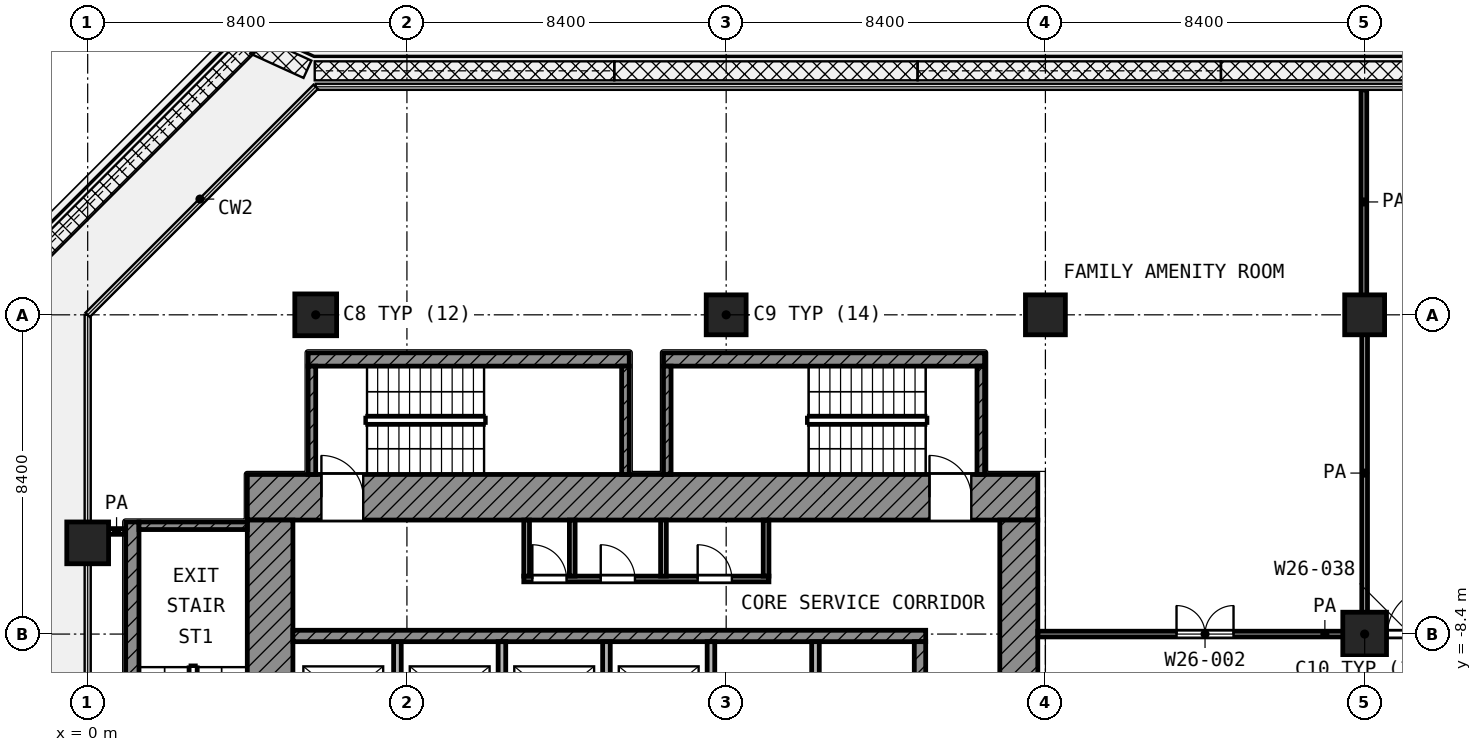
"""IFC4 building model, lengths in metres.
Left out: names, types, materials, properties, quantities, classifications, styles, units other than length and angle.
Written with IfcOpenShell. Run it as: python <this file> out.ifc"""

import sys

from ifc_helpers import new_model, si_unit, direction, frame, frame_2d, origin, origin_2d, place, context, subcontext, project, spatial, rectangle, extrude, element, fill, save


model = new_model("IFC4")
c1 = context("Model", 3, precision=1e-05, world=origin(), true_north=direction((0.0, 1.0)))
c2 = subcontext(c1, "Body", "Model", "MODEL_VIEW")
j1 = project(units=[si_unit("LENGTHUNIT", "METRE"), si_unit("PLANEANGLEUNIT", "RADIAN")], contexts=[c1])
p1 = place(None, origin())
s1 = spatial("IfcSite", under=j1, at=p1, CompositionType="ELEMENT")
p2 = place(p1, origin())
s2 = spatial("IfcBuilding", under=s1, at=p2, CompositionType="ELEMENT")
p3 = place(p2, frame((0.0, 0.0, 136.6)))
s3 = spatial("IfcBuildingStorey", under=s2, at=p3, CompositionType="ELEMENT", Elevation=136.6)
p4 = place(p3, frame((6.0, 0.0, 0.0), z_axis=(0.0, 0.0, 1.0), x_axis=(1.0, 0.0, 0.0)))
e1 = element("IfcColumn", 1, at=p4, inside=s3, PredefinedType="COLUMN", context=c2, shape_type="SweptSolid", body=[
    extrude(rectangle(XDim=1.1, YDim=1.1, at=origin_2d()), origin(), (0.0, 0.0, 1.0), 4.2),
])
for number, where, z_axis, x_axis in (
    (2, (16.8, 0.0, 0.0), (0.0, 0.0, 1.0), (1.0, 0.0, 0.0)),
    (3, (25.2, 0.0, 0.0), (0.0, 0.0, 1.0), (1.0, 0.0, 0.0)),
    (4, (33.6, 0.0, 0.0), (0.0, 0.0, 1.0), (1.0, 0.0, 0.0)),
):
    element("IfcColumn", number, at=place(p3, frame(where, z_axis=z_axis, x_axis=x_axis)), inside=s3, PredefinedType="COLUMN", context=c2, shape_type="SweptSolid", body=[
        extrude(rectangle(XDim=1.05, YDim=1.05, at=origin_2d()), origin(), (0.0, 0.0, 1.0), 4.2),
    ])
p5 = place(p3, frame((0.0, -6.0, 0.0), z_axis=(0.0, 0.0, 1.0), x_axis=(1.0, 0.0, 0.0)))
e5 = element("IfcColumn", 5, at=p5, inside=s3, PredefinedType="COLUMN", context=c2, shape_type="SweptSolid", body=[
    extrude(rectangle(XDim=1.1, YDim=1.1, at=origin_2d()), origin(), (0.0, 0.0, 1.0), 4.2),
])
p6 = place(p3, frame((33.6, -8.4, 0.0), z_axis=(0.0, 0.0, 1.0), x_axis=(1.0, 0.0, 0.0)))
e6 = element("IfcColumn", 6, at=p6, inside=s3, PredefinedType="COLUMN", context=c2, shape_type="SweptSolid", body=[
    extrude(rectangle(XDim=1.15, YDim=1.15, at=origin_2d()), origin(), (0.0, 0.0, 1.0), 4.2),
])
p7 = place(p3, frame((4.2, -4.8, 0.0), z_axis=(0.0, 0.0, 1.0), x_axis=(1.0, 0.0, 0.0)))
e7 = element("IfcWall", 7, at=p7, inside=s3, PredefinedType="SHEAR", context=c2, shape_type="SweptSolid", body=[
    extrude(rectangle(XDim=20.8, YDim=1.2, at=frame_2d((10.4, 0.0))), origin(), (0.0, 0.0, 1.0), 3.6),
])
p8 = place(p7, frame((1.95, 0.0, 0.0)))
e8 = element("IfcOpeningElement", 8, at=p8, cuts=e7, PredefinedType="OPENING", context=c2, shape_type="SweptSolid", body=[
    extrude(rectangle(XDim=1.1, YDim=2.1, at=frame_2d((0.55, 1.05))), frame((0.0, 0.61, 0.0), z_axis=(0.0, -1.0, 0.0), x_axis=(1.0, 0.0, 0.0)), (0.0, 0.0, 1.0), 1.22),
])
p9 = place(p7, frame((17.95, 0.0, 0.0)))
e9 = element("IfcOpeningElement", 9, at=p9, cuts=e7, PredefinedType="OPENING", context=c2, shape_type="SweptSolid", body=[
    extrude(rectangle(XDim=1.1, YDim=2.1, at=frame_2d((0.55, 1.05))), frame((0.0, 0.61, 0.0), z_axis=(0.0, -1.0, 0.0), x_axis=(1.0, 0.0, 0.0)), (0.0, 0.0, 1.0), 1.22),
])
p10 = place(p3, frame((4.8, -25.0, 0.0), z_axis=(0.0, 0.0, 1.0), x_axis=(0.0, 1.0, 0.0)))
e10 = element("IfcWall", 10, at=p10, inside=s3, PredefinedType="SHEAR", context=c2, shape_type="SweptSolid", body=[
    extrude(rectangle(XDim=19.6, YDim=1.2, at=frame_2d((9.8, 0.0))), origin(), (0.0, 0.0, 1.0), 3.6),
])
p11 = place(p10, frame((11.45, 0.0, 0.0)))
e11 = element("IfcOpeningElement", 11, at=p11, cuts=e10, PredefinedType="OPENING", context=c2, shape_type="SweptSolid", body=[
    extrude(rectangle(XDim=1.1, YDim=2.1, at=frame_2d((0.55, 1.05))), frame((0.0, 0.61, 0.0), z_axis=(0.0, -1.0, 0.0), x_axis=(1.0, 0.0, 0.0)), (0.0, 0.0, 1.0), 1.22),
])
p12 = place(p10, frame((2.15, 0.0, 0.0)))
e12 = element("IfcOpeningElement", 12, at=p12, cuts=e10, PredefinedType="OPENING", context=c2, shape_type="SweptSolid", body=[
    extrude(rectangle(XDim=1.1, YDim=2.1, at=frame_2d((0.55, 1.05))), frame((0.0, 0.61, 0.0), z_axis=(0.0, -1.0, 0.0), x_axis=(1.0, 0.0, 0.0)), (0.0, 0.0, 1.0), 1.22),
])
p13 = place(p3, frame((24.5, -24.0, 0.0), z_axis=(0.0, 0.0, 1.0), x_axis=(0.0, 1.0, 0.0)))
e13 = element("IfcWall", 13, at=p13, inside=s3, PredefinedType="SHEAR", context=c2, shape_type="SweptSolid", body=[
    extrude(rectangle(XDim=18.6, YDim=1.0, at=frame_2d((9.3, 0.0))), origin(), (0.0, 0.0, 1.0), 3.6),
])
p14 = place(p13, frame((10.5, 0.0, 0.0)))
e14 = element("IfcOpeningElement", 14, at=p14, cuts=e13, PredefinedType="OPENING", context=c2, shape_type="SweptSolid", body=[
    extrude(rectangle(XDim=1.8, YDim=2.1, at=frame_2d((0.9, 1.05))), frame((0.0, 0.51, 0.0), z_axis=(0.0, -1.0, 0.0), x_axis=(1.0, 0.0, 0.0)), (0.0, 0.0, 1.0), 1.02),
])
p15 = place(p3, frame((5.4, -8.45, 0.0), z_axis=(0.0, 0.0, 1.0), x_axis=(1.0, 0.0, 0.0)))
e15 = element("IfcWall", 15, at=p15, inside=s3, PredefinedType="SHEAR", context=c2, shape_type="SweptSolid", body=[
    extrude(rectangle(XDim=16.65, YDim=0.3, at=frame_2d((8.325, 0.0))), origin(), (0.0, 0.0, 1.0), 3.6),
])
p16 = place(p3, frame((21.9, -10.95, 0.0), z_axis=(0.0, 0.0, 1.0), x_axis=(0.0, 1.0, 0.0)))
e16 = element("IfcWall", 16, at=p16, inside=s3, PredefinedType="SHEAR", context=c2, shape_type="SweptSolid", body=[
    extrude(rectangle(XDim=2.35, YDim=0.3, at=frame_2d((1.175, 0.0))), origin(), (0.0, 0.0, 1.0), 3.6),
])
for number, where, z_axis, x_axis in (
    (17, (8.15, -10.95, 0.0), (0.0, 0.0, 1.0), (0.0, 1.0, 0.0)),
    (18, (10.9, -10.95, 0.0), (0.0, 0.0, 1.0), (0.0, 1.0, 0.0)),
    (19, (13.65, -10.95, 0.0), (0.0, 0.0, 1.0), (0.0, 1.0, 0.0)),
    (20, (16.4, -10.95, 0.0), (0.0, 0.0, 1.0), (0.0, 1.0, 0.0)),
    (21, (19.15, -10.95, 0.0), (0.0, 0.0, 1.0), (0.0, 1.0, 0.0)),
):
    element("IfcWall", number, at=place(p3, frame(where, z_axis=z_axis, x_axis=x_axis)), inside=s3, PredefinedType="PARTITIONING", context=c2, shape_type="SweptSolid", body=[
        extrude(rectangle(XDim=2.35, YDim=0.2, at=frame_2d((1.175, 0.0))), origin(), (0.0, 0.0, 1.0), 3.6),
    ])
p17 = place(p3, frame((11.475, -6.95, 0.0), z_axis=(0.0, 0.0, 1.0), x_axis=(1.0, 0.0, 0.0)))
e22 = element("IfcWall", 22, at=p17, inside=s3, PredefinedType="PARTITIONING", context=c2, shape_type="SweptSolid", body=[
    extrude(rectangle(XDim=6.45, YDim=0.15, at=frame_2d((3.225, 0.0))), origin(), (0.0, 0.0, 1.0), 3.6),
])
p18 = place(p17, frame((0.225, 0.0, 0.0)))
e23 = element("IfcOpeningElement", 23, at=p18, cuts=e22, PredefinedType="OPENING", context=c2, shape_type="SweptSolid", body=[
    extrude(rectangle(XDim=0.9, YDim=2.1, at=frame_2d((0.45, 1.05))), frame((0.0, 0.085, 0.0), z_axis=(0.0, -1.0, 0.0), x_axis=(1.0, 0.0, 0.0)), (0.0, 0.0, 1.0), 0.17),
])
p19 = place(p17, frame((2.025, 0.0, 0.0)))
e24 = element("IfcOpeningElement", 24, at=p19, cuts=e22, PredefinedType="OPENING", context=c2, shape_type="SweptSolid", body=[
    extrude(rectangle(XDim=0.9, YDim=2.1, at=frame_2d((0.45, 1.05))), frame((0.0, 0.085, 0.0), z_axis=(0.0, -1.0, 0.0), x_axis=(1.0, 0.0, 0.0)), (0.0, 0.0, 1.0), 0.17),
])
p20 = place(p17, frame((4.575, 0.0, 0.0)))
e25 = element("IfcOpeningElement", 25, at=p20, cuts=e22, PredefinedType="OPENING", context=c2, shape_type="SweptSolid", body=[
    extrude(rectangle(XDim=0.9, YDim=2.1, at=frame_2d((0.45, 1.05))), frame((0.0, 0.085, 0.0), z_axis=(0.0, -1.0, 0.0), x_axis=(1.0, 0.0, 0.0)), (0.0, 0.0, 1.0), 0.17),
])
for number, where, z_axis, x_axis in (
    (26, (11.55, -6.875, 0.0), (0.0, 0.0, 1.0), (0.0, 1.0, 0.0)),
    (27, (12.75, -6.875, 0.0), (0.0, 0.0, 1.0), (0.0, 1.0, 0.0)),
    (28, (15.15, -6.875, 0.0), (0.0, 0.0, 1.0), (0.0, 1.0, 0.0)),
    (29, (17.85, -6.875, 0.0), (0.0, 0.0, 1.0), (0.0, 1.0, 0.0)),
):
    element("IfcWall", number, at=place(p3, frame(where, z_axis=z_axis, x_axis=x_axis)), inside=s3, PredefinedType="PARTITIONING", context=c2, shape_type="SweptSolid", body=[
        extrude(rectangle(XDim=1.475, YDim=0.15, at=frame_2d((0.738, 0.0))), origin(), (0.0, 0.0, 1.0), 3.6),
    ])
p21 = place(p3, frame((1.175, -13.9, 0.0), z_axis=(0.0, 0.0, 1.0), x_axis=(0.0, 1.0, 0.0)))
e30 = element("IfcWall", 30, at=p21, inside=s3, PredefinedType="SHEAR", context=c2, shape_type="SweptSolid", body=[
    extrude(rectangle(XDim=8.45, YDim=0.35, at=frame_2d((4.225, 0.0))), origin(), (0.0, 0.0, 1.0), 3.6),
])
p22 = place(p3, frame((1.35, -5.55, 0.0), z_axis=(0.0, 0.0, 1.0), x_axis=(1.0, 0.0, 0.0)))
e31 = element("IfcWall", 31, at=p22, inside=s3, PredefinedType="SHEAR", context=c2, shape_type="SweptSolid", body=[
    extrude(rectangle(XDim=2.85, YDim=0.2, at=frame_2d((1.425, 0.0))), origin(), (0.0, 0.0, 1.0), 3.6),
])
p23 = place(p3, frame((5.8, -1.175, 0.0), z_axis=(0.0, 0.0, 1.0), x_axis=(1.0, 0.0, 0.0)))
e32 = element("IfcWall", 32, at=p23, inside=s3, PredefinedType="SHEAR", context=c2, shape_type="SweptSolid", body=[
    extrude(rectangle(XDim=8.45, YDim=0.35, at=frame_2d((4.225, 0.0))), origin(), (0.0, 0.0, 1.0), 3.6),
])
for number, where, z_axis, x_axis in (
    (33, (5.9, -4.2, 0.0), (0.0, 0.0, 1.0), (0.0, 1.0, 0.0)),
    (34, (14.15, -4.2, 0.0), (0.0, 0.0, 1.0), (0.0, 1.0, 0.0)),
):
    element("IfcWall", number, at=place(p3, frame(where, z_axis=z_axis, x_axis=x_axis)), inside=s3, PredefinedType="SHEAR", context=c2, shape_type="SweptSolid", body=[
        extrude(rectangle(XDim=2.85, YDim=0.2, at=frame_2d((1.425, 0.0))), origin(), (0.0, 0.0, 1.0), 3.6),
    ])
p24 = place(p3, frame((15.15, -1.175, 0.0), z_axis=(0.0, 0.0, 1.0), x_axis=(1.0, 0.0, 0.0)))
e35 = element("IfcWall", 35, at=p24, inside=s3, PredefinedType="SHEAR", context=c2, shape_type="SweptSolid", body=[
    extrude(rectangle(XDim=8.45, YDim=0.35, at=frame_2d((4.225, 0.0))), origin(), (0.0, 0.0, 1.0), 3.6),
])
for number, where, z_axis, x_axis in (
    (36, (15.25, -4.2, 0.0), (0.0, 0.0, 1.0), (0.0, 1.0, 0.0)),
    (37, (23.5, -4.2, 0.0), (0.0, 0.0, 1.0), (0.0, 1.0, 0.0)),
):
    element("IfcWall", number, at=place(p3, frame(where, z_axis=z_axis, x_axis=x_axis)), inside=s3, PredefinedType="SHEAR", context=c2, shape_type="SweptSolid", body=[
        extrude(rectangle(XDim=2.85, YDim=0.2, at=frame_2d((1.425, 0.0))), origin(), (0.0, 0.0, 1.0), 3.6),
    ])
p25 = place(p3, frame((25.0, -8.4, 0.0), z_axis=(0.0, 0.0, 1.0), x_axis=(1.0, 0.0, 0.0)))
e38 = element("IfcWall", 38, at=p25, inside=s3, PredefinedType="PARTITIONING", context=c2, shape_type="SweptSolid", body=[
    extrude(rectangle(XDim=15.107, YDim=0.15, at=frame_2d((7.553, 0.0))), origin(), (0.0, 0.0, 1.0), 3.6),
])
p26 = place(p25, frame((3.65, 0.0, 0.0)))
e39 = element("IfcOpeningElement", 39, at=p26, cuts=e38, PredefinedType="OPENING", context=c2, shape_type="SweptSolid", body=[
    extrude(rectangle(XDim=1.5, YDim=2.1, at=frame_2d((0.75, 1.05))), frame((0.0, 0.085, 0.0), z_axis=(0.0, -1.0, 0.0), x_axis=(1.0, 0.0, 0.0)), (0.0, 0.0, 1.0), 0.17),
])
p27 = place(p25, frame((9.2, 0.0, 0.0)))
e40 = element("IfcOpeningElement", 40, at=p27, cuts=e38, PredefinedType="OPENING", context=c2, shape_type="SweptSolid", body=[
    extrude(rectangle(XDim=1.2, YDim=2.1, at=frame_2d((0.6, 1.05))), frame((0.0, 0.085, 0.0), z_axis=(0.0, -1.0, 0.0), x_axis=(1.0, 0.0, 0.0)), (0.0, 0.0, 1.0), 0.17),
])
p28 = place(p3, frame((0.55, -5.7, 0.0), z_axis=(0.0, 0.0, 1.0), x_axis=(1.0, 0.0, 0.0)))
e41 = element("IfcWall", 41, at=p28, inside=s3, PredefinedType="PARTITIONING", context=c2, shape_type="SweptSolid", body=[
    extrude(rectangle(XDim=0.42, YDim=0.15, at=frame_2d((0.21, 0.0))), origin(), (0.0, 0.0, 1.0), 3.6),
])
p29 = place(p3, frame((33.58, 0.02, 0.0), z_axis=(0.0, 0.0, 1.0), x_axis=(0.0, 1.0, 0.0)))
e42 = element("IfcWall", 42, at=p29, inside=s3, PredefinedType="PARTITIONING", context=c2, shape_type="SweptSolid", body=[
    extrude(rectangle(XDim=5.9, YDim=0.15, at=frame_2d((2.95, 0.0))), origin(), (0.0, 0.0, 1.0), 3.6),
])
p30 = place(p3, frame((33.6, -8.325, 0.0), z_axis=(0.0, 0.0, 1.0), x_axis=(0.0, 1.0, 0.0)))
e43 = element("IfcWall", 43, at=p30, inside=s3, PredefinedType="PARTITIONING", context=c2, shape_type="SweptSolid", body=[
    extrude(rectangle(XDim=8.322, YDim=0.15, at=frame_2d((4.161, 0.0))), origin(), (0.0, 0.0, 1.0), 3.6),
])
p31 = place(p8, origin())
e44 = element("IfcDoor", 44, at=p31, inside=s3, OperationType="SINGLE_SWING_LEFT", PredefinedType="DOOR", context=c2, shape_type="SweptSolid", body=[
    extrude(rectangle(XDim=1.1, YDim=2.1, at=frame_2d((0.55, 1.05))), frame((0.0, 0.025, 0.0), z_axis=(0.0, -1.0, 0.0), x_axis=(1.0, 0.0, 0.0)), (0.0, 0.0, 1.0), 0.05),
])
fill(e8, e44)
p32 = place(p9, origin())
e45 = element("IfcDoor", 45, at=p32, inside=s3, OperationType="SINGLE_SWING_LEFT", PredefinedType="DOOR", context=c2, shape_type="SweptSolid", body=[
    extrude(rectangle(XDim=1.1, YDim=2.1, at=frame_2d((0.55, 1.05))), frame((0.0, 0.025, 0.0), z_axis=(0.0, -1.0, 0.0), x_axis=(1.0, 0.0, 0.0)), (0.0, 0.0, 1.0), 0.05),
])
fill(e9, e45)
p33 = place(p18, origin())
e46 = element("IfcDoor", 46, at=p33, inside=s3, OperationType="SINGLE_SWING_LEFT", PredefinedType="DOOR", context=c2, shape_type="SweptSolid", body=[
    extrude(rectangle(XDim=0.9, YDim=2.1, at=frame_2d((0.45, 1.05))), frame((0.0, 0.025, 0.0), z_axis=(0.0, -1.0, 0.0), x_axis=(1.0, 0.0, 0.0)), (0.0, 0.0, 1.0), 0.05),
])
fill(e23, e46)
p34 = place(p19, origin())
e47 = element("IfcDoor", 47, at=p34, inside=s3, OperationType="SINGLE_SWING_LEFT", PredefinedType="DOOR", context=c2, shape_type="SweptSolid", body=[
    extrude(rectangle(XDim=0.9, YDim=2.1, at=frame_2d((0.45, 1.05))), frame((0.0, 0.025, 0.0), z_axis=(0.0, -1.0, 0.0), x_axis=(1.0, 0.0, 0.0)), (0.0, 0.0, 1.0), 0.05),
])
fill(e24, e47)
p35 = place(p20, origin())
e48 = element("IfcDoor", 48, at=p35, inside=s3, OperationType="SINGLE_SWING_LEFT", PredefinedType="DOOR", context=c2, shape_type="SweptSolid", body=[
    extrude(rectangle(XDim=0.9, YDim=2.1, at=frame_2d((0.45, 1.05))), frame((0.0, 0.025, 0.0), z_axis=(0.0, -1.0, 0.0), x_axis=(1.0, 0.0, 0.0)), (0.0, 0.0, 1.0), 0.05),
])
fill(e25, e48)
p36 = place(p26, origin())
e49 = element("IfcDoor", 49, at=p36, inside=s3, OperationType="DOUBLE_DOOR_SINGLE_SWING", PredefinedType="DOOR", context=c2, shape_type="SweptSolid", body=[
    extrude(rectangle(XDim=1.5, YDim=2.1, at=frame_2d((0.75, 1.05))), frame((0.0, 0.025, 0.0), z_axis=(0.0, -1.0, 0.0), x_axis=(1.0, 0.0, 0.0)), (0.0, 0.0, 1.0), 0.05),
])
fill(e39, e49)
p37 = place(p27, origin())
e50 = element("IfcDoor", 50, at=p37, inside=s3, OperationType="SINGLE_SWING_RIGHT", PredefinedType="DOOR", context=c2, shape_type="SweptSolid", body=[
    extrude(rectangle(XDim=1.2, YDim=2.1, at=frame_2d((0.6, 1.05))), frame((0.0, 0.025, 0.0), z_axis=(0.0, -1.0, 0.0), x_axis=(1.0, 0.0, 0.0)), (0.0, 0.0, 1.0), 0.05),
])
fill(e40, e50)
save(model, sys.argv[1])
